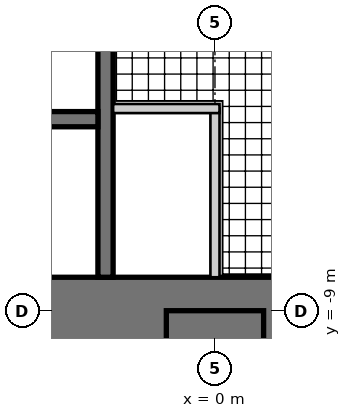
"""IFC4 building model, lengths in metres.
Left out: names, types, materials, properties, quantities, classifications, styles, units other than length and angle.
Written with IfcOpenShell. Run it as: python <this file> out.ifc"""

import sys

from ifc_helpers import new_model, si_unit, direction, frame, frame_2d, origin, place, context, subcontext, project, spatial, rectangle, extrude, element, fill, save


model = new_model("IFC4")
c1 = context("Model", 3, precision=1e-05, world=origin(), true_north=direction((0.0, 1.0)))
c2 = subcontext(c1, "Body", "Model", "MODEL_VIEW")
j1 = project(units=[si_unit("LENGTHUNIT", "METRE"), si_unit("PLANEANGLEUNIT", "RADIAN")], contexts=[c1])
p1 = place(None, origin())
s1 = spatial("IfcSite", under=j1, at=p1, CompositionType="ELEMENT")
p2 = place(p1, origin())
s2 = spatial("IfcBuilding", under=s1, at=p2, CompositionType="ELEMENT")
p3 = place(p2, frame((0.0, 0.0, 206.9)))
s3 = spatial("IfcBuildingStorey", under=s2, at=p3, CompositionType="ELEMENT", Elevation=206.9)
p4 = place(p3, frame((-9.0, -9.0, 0.0), z_axis=(0.0, 0.0, 1.0), x_axis=(1.0, 0.0, 0.0)))
e1 = element("IfcWall", 1, at=p4, inside=s3, PredefinedType="SHEAR", context=c2, shape_type="SweptSolid", body=[
    extrude(rectangle(XDim=18.0, YDim=1.1, at=frame_2d((9.0, 0.0))), origin(), (0.0, 0.0, 1.0), 3.4),
])
p5 = place(p4, frame((9.8, 0.0, 0.0)))
e2 = element("IfcOpeningElement", 2, at=p5, cuts=e1, PredefinedType="OPENING", context=c2, shape_type="SweptSolid", body=[
    extrude(rectangle(XDim=1.0, YDim=2.4, at=frame_2d((0.5, 1.2))), frame((0.0, 0.56, 0.0), z_axis=(0.0, -1.0, 0.0), x_axis=(1.0, 0.0, 0.0)), (0.0, 0.0, 1.0), 1.12),
])
p6 = place(p3, frame((-1.8, -1.875, 0.0), z_axis=(0.0, 0.0, 1.0), x_axis=(0.0, -1.0, 0.0)))
e3 = element("IfcWall", 3, at=p6, inside=s3, PredefinedType="SHEAR", context=c2, shape_type="SweptSolid", body=[
    extrude(rectangle(XDim=6.575, YDim=0.25, at=frame_2d((3.288, 0.0))), origin(), (0.0, 0.0, 1.0), 3.4),
])
p7 = place(p6, frame((1.875, 0.0, 0.0)))
e4 = element("IfcOpeningElement", 4, at=p7, cuts=e3, PredefinedType="OPENING", context=c2, shape_type="SweptSolid", body=[
    extrude(rectangle(XDim=1.6, YDim=2.4, at=frame_2d((0.8, 1.2))), frame((0.0, 0.135, 0.0), z_axis=(0.0, -1.0, 0.0), x_axis=(1.0, 0.0, 0.0)), (0.0, 0.0, 1.0), 0.27),
])
p8 = place(p3, frame((-1.925, -5.85, 0.0), z_axis=(0.0, 0.0, 1.0), x_axis=(-1.0, 0.0, 0.0)))
e5 = element("IfcWall", 5, at=p8, inside=s3, PredefinedType="SHEAR", context=c2, shape_type="SweptSolid", body=[
    extrude(rectangle(XDim=6.525, YDim=0.25, at=frame_2d((3.262, 0.0))), origin(), (0.0, 0.0, 1.0), 3.4),
])
p9 = place(p8, frame((0.471, 0.0, 0.0)))
e6 = element("IfcOpeningElement", 6, at=p9, cuts=e5, PredefinedType="OPENING", context=c2, shape_type="SweptSolid", body=[
    extrude(rectangle(XDim=1.1, YDim=2.2, at=frame_2d((0.55, 1.1))), frame((0.0, 0.135, 0.0), z_axis=(0.0, -1.0, 0.0), x_axis=(1.0, 0.0, 0.0)), (0.0, 0.0, 1.0), 0.27),
])
p10 = place(p8, frame((2.712, 0.0, 0.0)))
e7 = element("IfcOpeningElement", 7, at=p10, cuts=e5, PredefinedType="OPENING", context=c2, shape_type="SweptSolid", body=[
    extrude(rectangle(XDim=1.1, YDim=2.2, at=frame_2d((0.55, 1.1))), frame((0.0, 0.135, 0.0), z_axis=(0.0, -1.0, 0.0), x_axis=(1.0, 0.0, 0.0)), (0.0, 0.0, 1.0), 0.27),
])
p11 = place(p8, frame((4.954, 0.0, 0.0)))
e8 = element("IfcOpeningElement", 8, at=p11, cuts=e5, PredefinedType="OPENING", context=c2, shape_type="SweptSolid", body=[
    extrude(rectangle(XDim=1.1, YDim=2.2, at=frame_2d((0.55, 1.1))), frame((0.0, 0.135, 0.0), z_axis=(0.0, -1.0, 0.0), x_axis=(1.0, 0.0, 0.0)), (0.0, 0.0, 1.0), 0.27),
])
p12 = place(p3, frame((0.0, -9.0, 0.0), z_axis=(0.0, 0.0, 1.0), x_axis=(0.0, -1.0, 0.0)))
e9 = element("IfcWall", 9, at=p12, inside=s3, PredefinedType="SHEAR", context=c2, shape_type="SweptSolid", body=[
    extrude(rectangle(XDim=4.05, YDim=1.6, at=frame_2d((2.025, 0.0))), origin(), (0.0, 0.0, 1.0), 3.4),
])
p13 = place(p3, frame((0.0, -5.675, 0.0), z_axis=(0.0, 0.0, 1.0), x_axis=(0.0, -1.0, 0.0)))
e10 = element("IfcWall", 10, at=p13, inside=s3, PredefinedType="PARTITIONING", context=c2, shape_type="SweptSolid", body=[
    extrude(rectangle(XDim=2.775, YDim=0.15, at=frame_2d((1.387, 0.0))), origin(), (0.0, 0.0, 1.0), 3.22),
])
p14 = place(p13, frame((0.4, 0.0, 0.0)))
e11 = element("IfcOpeningElement", 11, at=p14, cuts=e10, PredefinedType="OPENING", context=c2, shape_type="SweptSolid", body=[
    extrude(rectangle(XDim=1.0, YDim=2.1, at=frame_2d((0.5, 1.05))), frame((0.0, 0.085, 0.0), z_axis=(0.0, -1.0, 0.0), x_axis=(1.0, 0.0, 0.0)), (0.0, 0.0, 1.0), 0.17),
])
p15 = place(p3, frame((-1.675, -5.675, 0.0), z_axis=(0.0, 0.0, 1.0), x_axis=(1.0, 0.0, 0.0)))
e12 = element("IfcWall", 12, at=p15, inside=s3, PredefinedType="PARTITIONING", context=c2, shape_type="SweptSolid", body=[
    extrude(rectangle(XDim=1.75, YDim=0.15, at=frame_2d((0.875, 0.0))), origin(), (0.0, 0.0, 1.0), 3.22),
])
p16 = place(p14, frame((1.0, 0.0, 0.0), z_axis=(0.0, 0.0, 1.0), x_axis=(-1.0, 0.0, 0.0)))
e13 = element("IfcDoor", 13, at=p16, inside=s3, OperationType="SINGLE_SWING_RIGHT", PredefinedType="DOOR", context=c2, shape_type="SweptSolid", body=[
    extrude(rectangle(XDim=1.0, YDim=2.1, at=frame_2d((0.5, 1.05))), frame((0.0, 0.025, 0.0), z_axis=(0.0, -1.0, 0.0), x_axis=(1.0, 0.0, 0.0)), (0.0, 0.0, 1.0), 0.05),
])
fill(e11, e13)
p17 = place(p5, origin())
e14 = element("IfcDoor", 14, at=p17, inside=s3, OperationType="SINGLE_SWING_RIGHT", PredefinedType="DOOR", context=c2, shape_type="SweptSolid", body=[
    extrude(rectangle(XDim=1.0, YDim=2.4, at=frame_2d((0.5, 1.2))), frame((0.0, 0.055, 0.0), z_axis=(0.0, -1.0, 0.0), x_axis=(1.0, 0.0, 0.0)), (0.0, 0.0, 1.0), 0.05),
])
fill(e2, e14)
p18 = place(p9, origin())
e15 = element("IfcDoor", 15, at=p18, inside=s3, OperationType="DOUBLE_DOOR_SLIDING", PredefinedType="DOOR", context=c2, shape_type="SweptSolid", body=[
    extrude(rectangle(XDim=1.1, YDim=2.2, at=frame_2d((0.55, 1.1))), frame((0.0, 0.025, 0.0), z_axis=(0.0, -1.0, 0.0), x_axis=(1.0, 0.0, 0.0)), (0.0, 0.0, 1.0), 0.05),
])
fill(e6, e15)
p19 = place(p7, origin())
e16 = element("IfcDoor", 16, at=p19, inside=s3, OperationType="DOUBLE_DOOR_DOUBLE_SWING", PredefinedType="DOOR", context=c2, shape_type="SweptSolid", body=[
    extrude(rectangle(XDim=1.6, YDim=2.4, at=frame_2d((0.8, 1.2))), frame((0.0, 0.025, 0.0), z_axis=(0.0, -1.0, 0.0), x_axis=(1.0, 0.0, 0.0)), (0.0, 0.0, 1.0), 0.05),
])
fill(e4, e16)
save(model, sys.argv[1])
